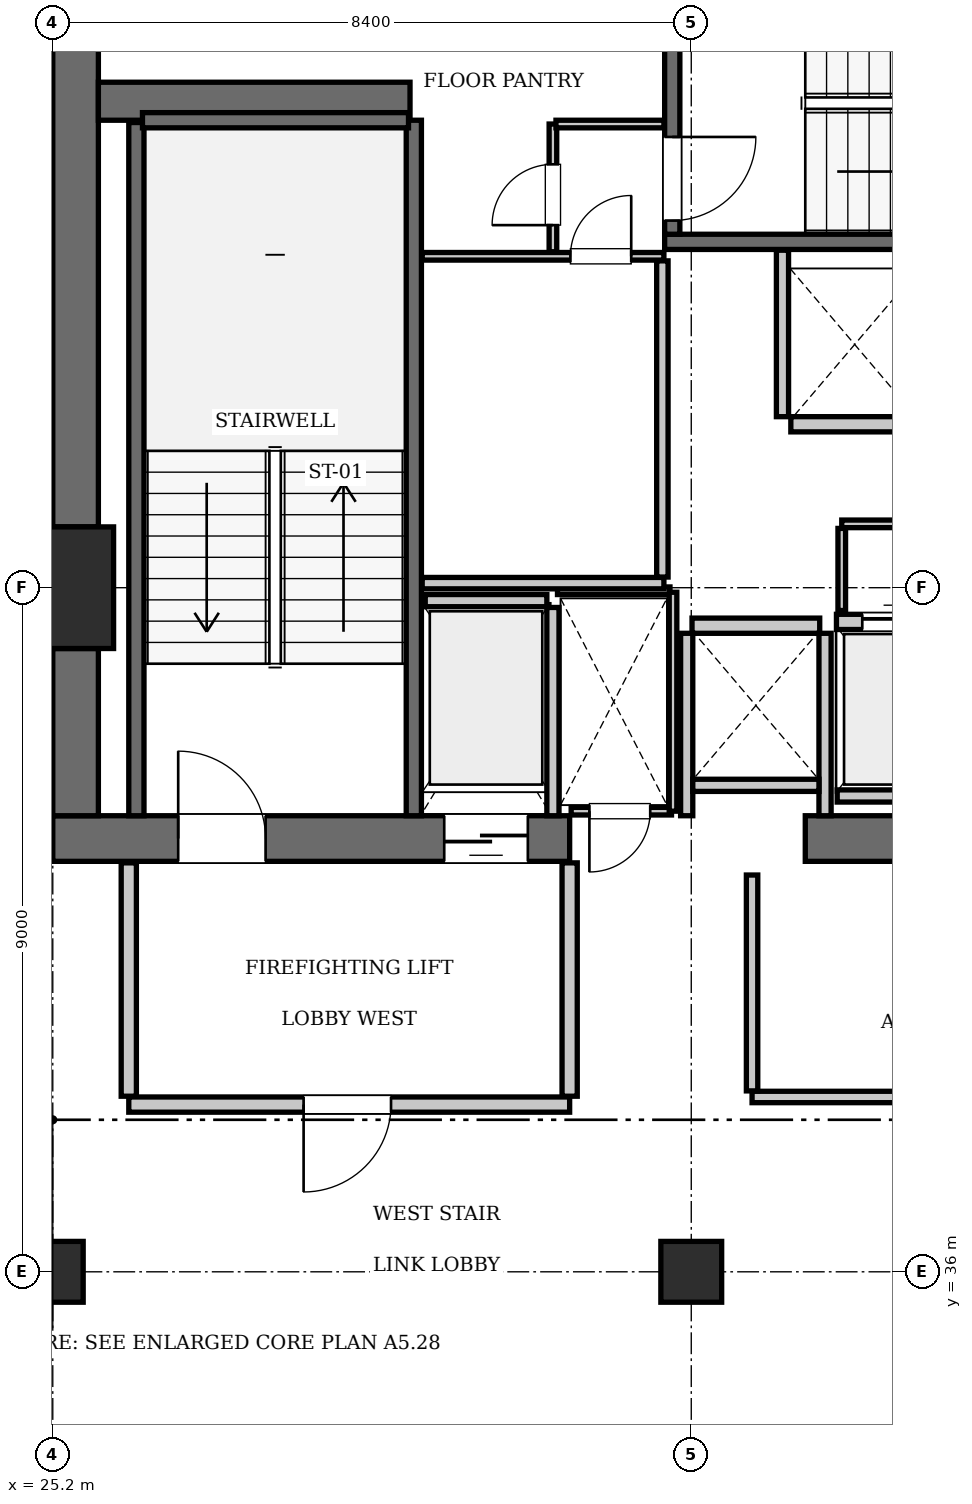
"""IFC4 building model, lengths in metres.
Left out: names, types, materials, properties, quantities, classifications, styles, units other than length and angle.
Written with IfcOpenShell. Run it as: python <this file> out.ifc"""

import sys

from ifc_helpers import new_model, si_unit, direction, frame, frame_2d, origin, origin_2d, place, context, subcontext, project, spatial, rectangle, extrude, element, fill, save


model = new_model("IFC4")
c1 = context("Model", 3, precision=1e-05, world=origin(), true_north=direction((0.0, 1.0)))
c2 = subcontext(c1, "Body", "Model", "MODEL_VIEW")
j1 = project(units=[si_unit("LENGTHUNIT", "METRE"), si_unit("PLANEANGLEUNIT", "RADIAN")], contexts=[c1])
p1 = place(None, origin())
s1 = spatial("IfcSite", under=j1, at=p1, CompositionType="ELEMENT")
p2 = place(p1, origin())
s2 = spatial("IfcBuilding", under=s1, at=p2, CompositionType="ELEMENT")
p3 = place(p2, frame((0.0, 0.0, 281.75)))
s3 = spatial("IfcBuildingStorey", under=s2, at=p3, CompositionType="ELEMENT", Elevation=281.75)
p4 = place(p3, frame((25.2, 45.0, 0.0), z_axis=(0.0, 0.0, 1.0), x_axis=(1.0, 0.0, 0.0)))
e1 = element("IfcColumn", 1, at=p4, inside=s3, PredefinedType="COLUMN", context=c2, shape_type="SweptSolid", body=[
    extrude(rectangle(XDim=1.6, YDim=1.6, at=origin_2d()), origin(), (0.0, 0.0, 1.0), 3.85),
])
p5 = place(p3, frame((25.2, 41.7, 0.0), z_axis=(0.0, 0.0, 1.0), x_axis=(1.0, 0.0, 0.0)))
e2 = element("IfcWall", 2, at=p5, inside=s3, PredefinedType="SHEAR", context=c2, shape_type="SweptSolid", body=[
    extrude(rectangle(XDim=6.8, YDim=0.6, at=frame_2d((3.4, 0.0))), origin(), (0.0, 0.0, 1.0), 3.85),
])
p6 = place(p5, frame((1.65, 0.0, 0.0)))
e3 = element("IfcOpeningElement", 3, at=p6, cuts=e2, PredefinedType="OPENING", context=c2, shape_type="SweptSolid", body=[
    extrude(rectangle(XDim=1.15, YDim=2.15, at=frame_2d((0.575, 1.075))), frame((0.0, 0.31, 0.0), z_axis=(0.0, -1.0, 0.0), x_axis=(1.0, 0.0, 0.0)), (0.0, 0.0, 1.0), 0.62),
])
p7 = place(p5, frame((5.15, 0.0, 0.0)))
e4 = element("IfcOpeningElement", 4, at=p7, cuts=e2, PredefinedType="OPENING", context=c2, shape_type="SweptSolid", body=[
    extrude(rectangle(XDim=1.1, YDim=2.2, at=frame_2d((0.55, 1.1))), frame((0.0, 0.31, 0.0), z_axis=(0.0, -1.0, 0.0), x_axis=(1.0, 0.0, 0.0)), (0.0, 0.0, 1.0), 0.62),
])
p8 = place(p3, frame((35.1, 41.7, 0.0), z_axis=(0.0, 0.0, 1.0), x_axis=(1.0, 0.0, 0.0)))
e5 = element("IfcWall", 5, at=p8, inside=s3, PredefinedType="SHEAR", context=c2, shape_type="SweptSolid", body=[
    extrude(rectangle(XDim=5.4, YDim=0.6, at=frame_2d((2.7, 0.0))), origin(), (0.0, 0.0, 1.0), 3.85),
])
p9 = place(p3, frame((25.5, 42.0, 0.0), z_axis=(0.0, 0.0, 1.0), x_axis=(0.0, 1.0, 0.0)))
e6 = element("IfcWall", 6, at=p9, inside=s3, PredefinedType="SHEAR", context=c2, shape_type="SweptSolid", body=[
    extrude(rectangle(XDim=2.2, YDim=0.6, at=frame_2d((1.1, 0.0))), origin(), (0.0, 0.0, 1.0), 3.85),
])
p10 = place(p3, frame((25.5, 45.8, 0.0), z_axis=(0.0, 0.0, 1.0), x_axis=(0.0, 1.0, 0.0)))
e7 = element("IfcWall", 7, at=p10, inside=s3, PredefinedType="SHEAR", context=c2, shape_type="SweptSolid", body=[
    extrude(rectangle(XDim=7.6, YDim=0.6, at=frame_2d((3.8, 0.0))), origin(), (0.0, 0.0, 1.0), 3.85),
])
p11 = place(p3, frame((25.8, 51.4, 0.0), z_axis=(0.0, 0.0, 1.0), x_axis=(1.0, 0.0, 0.0)))
e8 = element("IfcWall", 8, at=p11, inside=s3, PredefinedType="SHEAR", context=c2, shape_type="SweptSolid", body=[
    extrude(rectangle(XDim=4.1, YDim=0.5, at=frame_2d((2.05, 0.0))), origin(), (0.0, 0.0, 1.0), 3.85),
])
for number, where, z_axis, x_axis in (
    (9, (25.2, 36.0, 0.0), (0.0, 0.0, 1.0), (1.0, 0.0, 0.0)),
    (10, (33.6, 36.0, 0.0), (0.0, 0.0, 1.0), (1.0, 0.0, 0.0)),
):
    element("IfcColumn", number, at=place(p3, frame(where, z_axis=z_axis, x_axis=x_axis)), inside=s3, PredefinedType="COLUMN", context=c2, shape_type="SweptSolid", body=[
        extrude(rectangle(XDim=0.8, YDim=0.8, at=origin_2d()), origin(), (0.0, 0.0, 1.0), 3.85),
    ])
p12 = place(p3, frame((29.95, 42.0, 0.0), z_axis=(0.0, 0.0, 1.0), x_axis=(0.0, 1.0, 0.0)))
e11 = element("IfcWall", 11, at=p12, inside=s3, PredefinedType="SOLIDWALL", context=c2, shape_type="SweptSolid", body=[
    extrude(rectangle(XDim=9.15, YDim=0.2, at=frame_2d((4.575, 0.0))), origin(), (0.0, 0.0, 1.0), 3.61),
])
p13 = place(p3, frame((26.3, 42.0, 0.0), z_axis=(0.0, 0.0, 1.0), x_axis=(0.0, 1.0, 0.0)))
e12 = element("IfcWall", 12, at=p13, inside=s3, PredefinedType="SOLIDWALL", context=c2, shape_type="SweptSolid", body=[
    extrude(rectangle(XDim=9.12, YDim=0.2, at=frame_2d((4.56, 0.0))), origin(), (0.0, 0.0, 1.0), 3.61),
])
p14 = place(p3, frame((26.38, 51.15, 0.0), z_axis=(0.0, 0.0, 1.0), x_axis=(1.0, 0.0, 0.0)))
e13 = element("IfcWall", 13, at=p14, inside=s3, PredefinedType="SOLIDWALL", context=c2, shape_type="SweptSolid", body=[
    extrude(rectangle(XDim=3.5, YDim=0.2, at=frame_2d((1.75, 0.0))), origin(), (0.0, 0.0, 1.0), 3.61),
])
p15 = place(p3, frame((33.25, 49.55, 0.0), z_axis=(0.0, 0.0, 1.0), x_axis=(1.0, 0.0, 0.0)))
e14 = element("IfcWall", 14, at=p15, inside=s3, PredefinedType="SOLIDWALL", context=c2, shape_type="SweptSolid", body=[
    extrude(rectangle(XDim=9.1, YDim=0.2, at=frame_2d((4.55, 0.0))), origin(), (0.0, 0.0, 1.0), 3.61),
])
p16 = place(p3, frame((33.35, 49.65, 0.0), z_axis=(0.0, 0.0, 1.0), x_axis=(0.0, 1.0, 0.0)))
e15 = element("IfcWall", 15, at=p16, inside=s3, PredefinedType="SOLIDWALL", context=c2, shape_type="SweptSolid", body=[
    extrude(rectangle(XDim=3.75, YDim=0.2, at=frame_2d((1.875, 0.0))), origin(), (0.0, 0.0, 1.0), 3.61),
])
p17 = place(p16, frame((0.18, 0.0, 0.0)))
e16 = element("IfcOpeningElement", 16, at=p17, cuts=e15, PredefinedType="OPENING", context=c2, shape_type="SweptSolid", body=[
    extrude(rectangle(XDim=1.1, YDim=2.15, at=frame_2d((0.55, 1.075))), frame((0.0, 0.11, 0.0), z_axis=(0.0, -1.0, 0.0), x_axis=(1.0, 0.0, 0.0)), (0.0, 0.0, 1.0), 0.22),
])
p18 = place(p3, frame((35.51, 44.55, 0.0), z_axis=(0.0, 0.0, 1.0), x_axis=(1.0, 0.0, 0.0)))
e17 = element("IfcWall", 17, at=p18, inside=s3, PredefinedType="SOLIDWALL", context=c2, shape_type="SweptSolid", body=[
    extrude(rectangle(XDim=1.68, YDim=0.2, at=frame_2d((0.84, 0.0))), origin(), (0.0, 0.0, 1.0), 3.61),
])
p19 = place(p18, frame((0.34, 0.0, 0.0)))
e18 = element("IfcOpeningElement", 18, at=p19, cuts=e17, PredefinedType="OPENING", context=c2, shape_type="SweptSolid", body=[
    extrude(rectangle(XDim=1.0, YDim=2.15, at=frame_2d((0.5, 1.075))), frame((0.0, 0.11, 0.0), z_axis=(0.0, -1.0, 0.0), x_axis=(1.0, 0.0, 0.0)), (0.0, 0.0, 1.0), 0.22),
])
p20 = place(p3, frame((34.91, 47.15, 0.0), z_axis=(0.0, 0.0, 1.0), x_axis=(1.0, 0.0, 0.0)))
e19 = element("IfcWall", 19, at=p20, inside=s3, PredefinedType="SOLIDWALL", context=c2, shape_type="SweptSolid", body=[
    extrude(rectangle(XDim=1.68, YDim=0.2, at=frame_2d((0.84, 0.0))), origin(), (0.0, 0.0, 1.0), 3.61),
])
p21 = place(p3, frame((33.61, 44.5, 0.0), z_axis=(0.0, 0.0, 1.0), x_axis=(1.0, 0.0, 0.0)))
e20 = element("IfcWall", 20, at=p21, inside=s3, PredefinedType="SOLIDWALL", context=c2, shape_type="SweptSolid", body=[
    extrude(rectangle(XDim=1.68, YDim=0.2, at=frame_2d((0.84, 0.0))), origin(), (0.0, 0.0, 1.0), 3.61),
])
p22 = place(p3, frame((30.1, 44.83, 0.0), z_axis=(0.0, 0.0, 1.0), x_axis=(1.0, 0.0, 0.0)))
e21 = element("IfcWall", 21, at=p22, inside=s3, PredefinedType="SOLIDWALL", context=c2, shape_type="SweptSolid", body=[
    extrude(rectangle(XDim=1.6, YDim=0.16, at=frame_2d((0.8, 0.0))), origin(), (0.0, 0.0, 1.0), 3.61),
])
p23 = place(p3, frame((31.78, 42.0, 0.0), z_axis=(0.0, 0.0, 1.0), x_axis=(0.0, 1.0, 0.0)))
e22 = element("IfcWall", 22, at=p23, inside=s3, PredefinedType="SOLIDWALL", context=c2, shape_type="SweptSolid", body=[
    extrude(rectangle(XDim=2.74, YDim=0.16, at=frame_2d((1.37, 0.0))), origin(), (0.0, 0.0, 1.0), 3.61),
])
p24 = place(p3, frame((35.52, 42.26, 0.0), z_axis=(0.0, 0.0, 1.0), x_axis=(1.0, 0.0, 0.0)))
e23 = element("IfcWall", 23, at=p24, inside=s3, PredefinedType="SOLIDWALL", context=c2, shape_type="SweptSolid", body=[
    extrude(rectangle(XDim=5.02, YDim=0.16, at=frame_2d((2.51, 0.0))), origin(), (0.0, 0.0, 1.0), 3.61),
])
p25 = place(p3, frame((34.8, 47.25, 0.0), z_axis=(0.0, 0.0, 1.0), x_axis=(0.0, 1.0, 0.0)))
e24 = element("IfcWall", 24, at=p25, inside=s3, PredefinedType="SOLIDWALL", context=c2, shape_type="SweptSolid", body=[
    extrude(rectangle(XDim=2.19, YDim=0.16, at=frame_2d((1.095, 0.0))), origin(), (0.0, 0.0, 1.0), 3.61),
])
for number, where, z_axis, x_axis in (
    (25, (33.54, 42.0, 0.0), (0.0, 0.0, 1.0), (0.0, 1.0, 0.0)),
    (26, (35.36, 42.0, 0.0), (0.0, 0.0, 1.0), (0.0, 1.0, 0.0)),
):
    element("IfcWall", number, at=place(p3, frame(where, z_axis=z_axis, x_axis=x_axis)), inside=s3, PredefinedType="SOLIDWALL", context=c2, shape_type="SweptSolid", body=[
        extrude(rectangle(XDim=2.4, YDim=0.16, at=frame_2d((1.2, 0.0))), origin(), (0.0, 0.0, 1.0), 3.61),
    ])
p26 = place(p3, frame((33.62, 42.4, 0.0), z_axis=(0.0, 0.0, 1.0), x_axis=(1.0, 0.0, 0.0)))
e27 = element("IfcWall", 27, at=p26, inside=s3, PredefinedType="SOLIDWALL", context=c2, shape_type="SweptSolid", body=[
    extrude(rectangle(XDim=1.66, YDim=0.16, at=frame_2d((0.83, 0.0))), origin(), (0.0, 0.0, 1.0), 3.61),
])
p27 = place(p3, frame((26.2, 38.2, 0.0), z_axis=(0.0, 0.0, 1.0), x_axis=(1.0, 0.0, 0.0)))
e28 = element("IfcWall", 28, at=p27, inside=s3, PredefinedType="PARTITIONING", context=c2, shape_type="SweptSolid", body=[
    extrude(rectangle(XDim=5.8, YDim=0.2, at=frame_2d((2.9, 0.0))), origin(), (0.0, 0.0, 1.0), 3.61),
])
p28 = place(p27, frame((2.3, 0.0, 0.0)))
e29 = element("IfcOpeningElement", 29, at=p28, cuts=e28, PredefinedType="OPENING", context=c2, shape_type="SweptSolid", body=[
    extrude(rectangle(XDim=1.15, YDim=2.15, at=frame_2d((0.575, 1.075))), frame((0.0, 0.11, 0.0), z_axis=(0.0, -1.0, 0.0), x_axis=(1.0, 0.0, 0.0)), (0.0, 0.0, 1.0), 0.22),
])
for number, where, z_axis, x_axis in (
    (30, (26.2, 38.31, 0.0), (0.0, 0.0, 1.0), (0.0, 1.0, 0.0)),
    (31, (32.0, 38.31, 0.0), (0.0, 0.0, 1.0), (0.0, 1.0, 0.0)),
):
    element("IfcWall", number, at=place(p3, frame(where, z_axis=z_axis, x_axis=x_axis)), inside=s3, PredefinedType="PARTITIONING", context=c2, shape_type="SweptSolid", body=[
        extrude(rectangle(XDim=3.07, YDim=0.2, at=frame_2d((1.535, 0.0))), origin(), (0.0, 0.0, 1.0), 3.61),
    ])
p29 = place(p3, frame((32.02, 42.06, 0.0), z_axis=(0.0, 0.0, 1.0), x_axis=(1.0, 0.0, 0.0)))
e32 = element("IfcWall", 32, at=p29, inside=s3, PredefinedType="PARTITIONING", context=c2, shape_type="SweptSolid", body=[
    extrude(rectangle(XDim=1.32, YDim=0.1, at=frame_2d((0.66, 0.0))), origin(), (0.0, 0.0, 1.0), 3.61),
])
p30 = place(p29, frame((0.24, 0.0, 0.0)))
e33 = element("IfcOpeningElement", 33, at=p30, cuts=e32, PredefinedType="OPENING", context=c2, shape_type="SweptSolid", body=[
    extrude(rectangle(XDim=0.8, YDim=2.05, at=frame_2d((0.4, 1.025))), frame((0.0, 0.06, 0.0), z_axis=(0.0, -1.0, 0.0), x_axis=(1.0, 0.0, 0.0)), (0.0, 0.0, 1.0), 0.12),
])
p31 = place(p3, frame((31.84, 44.96, 0.0), z_axis=(0.0, 0.0, 1.0), x_axis=(1.0, 0.0, 0.0)))
e34 = element("IfcWall", 34, at=p31, inside=s3, PredefinedType="PARTITIONING", context=c2, shape_type="SweptSolid", body=[
    extrude(rectangle(XDim=1.48, YDim=0.1, at=frame_2d((0.74, 0.0))), origin(), (0.0, 0.0, 1.0), 3.61),
])
p32 = place(p3, frame((33.36, 42.06, 0.0), z_axis=(0.0, 0.0, 1.0), x_axis=(0.0, 1.0, 0.0)))
e35 = element("IfcWall", 35, at=p32, inside=s3, PredefinedType="PARTITIONING", context=c2, shape_type="SweptSolid", body=[
    extrude(rectangle(XDim=2.88, YDim=0.1, at=frame_2d((1.44, 0.0))), origin(), (0.0, 0.0, 1.0), 3.61),
])
p33 = place(p3, frame((35.58, 45.84, 0.0), z_axis=(0.0, 0.0, 1.0), x_axis=(1.0, 0.0, 0.0)))
e36 = element("IfcWall", 36, at=p33, inside=s3, PredefinedType="PARTITIONING", context=c2, shape_type="SweptSolid", body=[
    extrude(rectangle(XDim=4.94, YDim=0.1, at=frame_2d((2.47, 0.0))), origin(), (0.0, 0.0, 1.0), 3.61),
])
p34 = place(p33, frame((1.8, 0.0, 0.0)))
e37 = element("IfcOpeningElement", 37, at=p34, cuts=e36, PredefinedType="OPENING", context=c2, shape_type="SweptSolid", body=[
    extrude(rectangle(XDim=0.8, YDim=2.05, at=frame_2d((0.4, 1.025))), frame((0.0, 0.06, 0.0), z_axis=(0.0, -1.0, 0.0), x_axis=(1.0, 0.0, 0.0)), (0.0, 0.0, 1.0), 0.12),
])
p35 = place(p3, frame((35.58, 44.7, 0.0), z_axis=(0.0, 0.0, 1.0), x_axis=(0.0, 1.0, 0.0)))
e38 = element("IfcWall", 38, at=p35, inside=s3, PredefinedType="PARTITIONING", context=c2, shape_type="SweptSolid", body=[
    extrude(rectangle(XDim=1.08, YDim=0.1, at=frame_2d((0.54, 0.0))), origin(), (0.0, 0.0, 1.0), 3.61),
])
p36 = place(p3, frame((30.06, 45.06, 0.0), z_axis=(0.0, 0.0, 1.0), x_axis=(1.0, 0.0, 0.0)))
e39 = element("IfcWall", 39, at=p36, inside=s3, PredefinedType="PARTITIONING", context=c2, shape_type="SweptSolid", body=[
    extrude(rectangle(XDim=3.18, YDim=0.15, at=frame_2d((1.59, 0.0))), origin(), (0.0, 0.0, 1.0), 3.61),
])
p37 = place(p3, frame((33.22, 45.14, 0.0), z_axis=(0.0, 0.0, 1.0), x_axis=(0.0, 1.0, 0.0)))
e40 = element("IfcWall", 40, at=p37, inside=s3, PredefinedType="PARTITIONING", context=c2, shape_type="SweptSolid", body=[
    extrude(rectangle(XDim=4.16, YDim=0.15, at=frame_2d((2.08, 0.0))), origin(), (0.0, 0.0, 1.0), 3.61),
])
p38 = place(p3, frame((30.06, 49.36, 0.0), z_axis=(0.0, 0.0, 1.0), x_axis=(1.0, 0.0, 0.0)))
e41 = element("IfcWall", 41, at=p38, inside=s3, PredefinedType="PARTITIONING", context=c2, shape_type="SweptSolid", body=[
    extrude(rectangle(XDim=3.18, YDim=0.1, at=frame_2d((1.59, 0.0))), origin(), (0.0, 0.0, 1.0), 3.61),
])
p39 = place(p38, frame((1.95, 0.0, 0.0)))
e42 = element("IfcOpeningElement", 42, at=p39, cuts=e41, PredefinedType="OPENING", context=c2, shape_type="SweptSolid", body=[
    extrude(rectangle(XDim=0.8, YDim=2.05, at=frame_2d((0.4, 1.025))), frame((0.0, 0.06, 0.0), z_axis=(0.0, -1.0, 0.0), x_axis=(1.0, 0.0, 0.0)), (0.0, 0.0, 1.0), 0.12),
])
p40 = place(p3, frame((31.78, 49.42, 0.0), z_axis=(0.0, 0.0, 1.0), x_axis=(0.0, 1.0, 0.0)))
e43 = element("IfcWall", 43, at=p40, inside=s3, PredefinedType="PARTITIONING", context=c2, shape_type="SweptSolid", body=[
    extrude(rectangle(XDim=1.68, YDim=0.1, at=frame_2d((0.84, 0.0))), origin(), (0.0, 0.0, 1.0), 3.61),
])
p41 = place(p40, frame((0.35, 0.0, 0.0)))
e44 = element("IfcOpeningElement", 44, at=p41, cuts=e43, PredefinedType="OPENING", context=c2, shape_type="SweptSolid", body=[
    extrude(rectangle(XDim=0.8, YDim=2.05, at=frame_2d((0.4, 1.025))), frame((0.0, 0.06, 0.0), z_axis=(0.0, -1.0, 0.0), x_axis=(1.0, 0.0, 0.0)), (0.0, 0.0, 1.0), 0.12),
])
p42 = place(p3, frame((31.82, 51.1, 0.0), z_axis=(0.0, 0.0, 1.0), x_axis=(1.0, 0.0, 0.0)))
e45 = element("IfcWall", 45, at=p42, inside=s3, PredefinedType="PARTITIONING", context=c2, shape_type="SweptSolid", body=[
    extrude(rectangle(XDim=1.42, YDim=0.1, at=frame_2d((0.71, 0.0))), origin(), (0.0, 0.0, 1.0), 3.61),
])
p43 = place(p3, frame((34.4, 38.3, 0.0), z_axis=(0.0, 0.0, 1.0), x_axis=(1.0, 0.0, 0.0)))
e46 = element("IfcWall", 46, at=p43, inside=s3, PredefinedType="PARTITIONING", context=c2, shape_type="SweptSolid", body=[
    extrude(rectangle(XDim=5.92, YDim=0.15, at=frame_2d((2.96, 0.0))), origin(), (0.0, 0.0, 1.0), 3.61),
])
p44 = place(p43, frame((2.4, 0.0, 0.0)))
e47 = element("IfcOpeningElement", 47, at=p44, cuts=e46, PredefinedType="OPENING", context=c2, shape_type="SweptSolid", body=[
    extrude(rectangle(XDim=0.9, YDim=2.1, at=frame_2d((0.45, 1.05))), frame((0.0, 0.085, 0.0), z_axis=(0.0, -1.0, 0.0), x_axis=(1.0, 0.0, 0.0)), (0.0, 0.0, 1.0), 0.17),
])
p45 = place(p3, frame((34.4, 38.38, 0.0), z_axis=(0.0, 0.0, 1.0), x_axis=(0.0, 1.0, 0.0)))
e48 = element("IfcWall", 48, at=p45, inside=s3, PredefinedType="PARTITIONING", context=c2, shape_type="SweptSolid", body=[
    extrude(rectangle(XDim=2.84, YDim=0.15, at=frame_2d((1.42, 0.0))), origin(), (0.0, 0.0, 1.0), 3.61),
])
p46 = place(p6, origin())
e49 = element("IfcDoor", 49, at=p46, inside=s3, OperationType="SINGLE_SWING_LEFT", PredefinedType="DOOR", context=c2, shape_type="SweptSolid", body=[
    extrude(rectangle(XDim=1.15, YDim=2.15, at=frame_2d((0.575, 1.075))), frame((0.0, 0.025, 0.0), z_axis=(0.0, -1.0, 0.0), x_axis=(1.0, 0.0, 0.0)), (0.0, 0.0, 1.0), 0.05),
])
fill(e3, e49)
p47 = place(p17, frame((1.1, 0.0, 0.0), z_axis=(0.0, 0.0, 1.0), x_axis=(-1.0, 0.0, 0.0)))
e50 = element("IfcDoor", 50, at=p47, inside=s3, OperationType="SINGLE_SWING_LEFT", PredefinedType="DOOR", context=c2, shape_type="SweptSolid", body=[
    extrude(rectangle(XDim=1.1, YDim=2.15, at=frame_2d((0.55, 1.075))), frame((0.0, 0.025, 0.0), z_axis=(0.0, -1.0, 0.0), x_axis=(1.0, 0.0, 0.0)), (0.0, 0.0, 1.0), 0.05),
])
fill(e16, e50)
p48 = place(p19, origin())
e51 = element("IfcDoor", 51, at=p48, inside=s3, OperationType="SLIDING_TO_LEFT", PredefinedType="DOOR", context=c2, shape_type="SweptSolid", body=[
    extrude(rectangle(XDim=1.0, YDim=2.15, at=frame_2d((0.5, 1.075))), frame((0.0, 0.025, 0.0), z_axis=(0.0, -1.0, 0.0), x_axis=(1.0, 0.0, 0.0)), (0.0, 0.0, 1.0), 0.05),
])
fill(e18, e51)
p49 = place(p7, frame((1.1, 0.0, 0.0), z_axis=(0.0, 0.0, 1.0), x_axis=(-1.0, 0.0, 0.0)))
e52 = element("IfcDoor", 52, at=p49, inside=s3, OperationType="SLIDING_TO_LEFT", PredefinedType="DOOR", context=c2, shape_type="SweptSolid", body=[
    extrude(rectangle(XDim=1.1, YDim=2.2, at=frame_2d((0.55, 1.1))), frame((0.0, 0.025, 0.0), z_axis=(0.0, -1.0, 0.0), x_axis=(1.0, 0.0, 0.0)), (0.0, 0.0, 1.0), 0.05),
])
fill(e4, e52)
p50 = place(p28, frame((1.15, 0.0, 0.0), z_axis=(0.0, 0.0, 1.0), x_axis=(-1.0, 0.0, 0.0)))
e53 = element("IfcDoor", 53, at=p50, inside=s3, OperationType="SINGLE_SWING_RIGHT", PredefinedType="DOOR", context=c2, shape_type="SweptSolid", body=[
    extrude(rectangle(XDim=1.15, YDim=2.15, at=frame_2d((0.575, 1.075))), frame((0.0, 0.025, 0.0), z_axis=(0.0, -1.0, 0.0), x_axis=(1.0, 0.0, 0.0)), (0.0, 0.0, 1.0), 0.05),
])
fill(e29, e53)
p51 = place(p30, frame((0.8, 0.0, 0.0), z_axis=(0.0, 0.0, 1.0), x_axis=(-1.0, 0.0, 0.0)))
e54 = element("IfcDoor", 54, at=p51, inside=s3, OperationType="SINGLE_SWING_RIGHT", PredefinedType="DOOR", context=c2, shape_type="SweptSolid", body=[
    extrude(rectangle(XDim=0.8, YDim=2.05, at=frame_2d((0.4, 1.025))), frame((0.0, 0.025, 0.0), z_axis=(0.0, -1.0, 0.0), x_axis=(1.0, 0.0, 0.0)), (0.0, 0.0, 1.0), 0.05),
])
fill(e33, e54)
p52 = place(p39, origin())
e55 = element("IfcDoor", 55, at=p52, inside=s3, OperationType="SINGLE_SWING_RIGHT", PredefinedType="DOOR", context=c2, shape_type="SweptSolid", body=[
    extrude(rectangle(XDim=0.8, YDim=2.05, at=frame_2d((0.4, 1.025))), frame((0.0, 0.025, 0.0), z_axis=(0.0, -1.0, 0.0), x_axis=(1.0, 0.0, 0.0)), (0.0, 0.0, 1.0), 0.05),
])
fill(e42, e55)
p53 = place(p41, origin())
e56 = element("IfcDoor", 56, at=p53, inside=s3, OperationType="SINGLE_SWING_LEFT", PredefinedType="DOOR", context=c2, shape_type="SweptSolid", body=[
    extrude(rectangle(XDim=0.8, YDim=2.05, at=frame_2d((0.4, 1.025))), frame((0.0, 0.025, 0.0), z_axis=(0.0, -1.0, 0.0), x_axis=(1.0, 0.0, 0.0)), (0.0, 0.0, 1.0), 0.05),
])
fill(e44, e56)
save(model, sys.argv[1])
